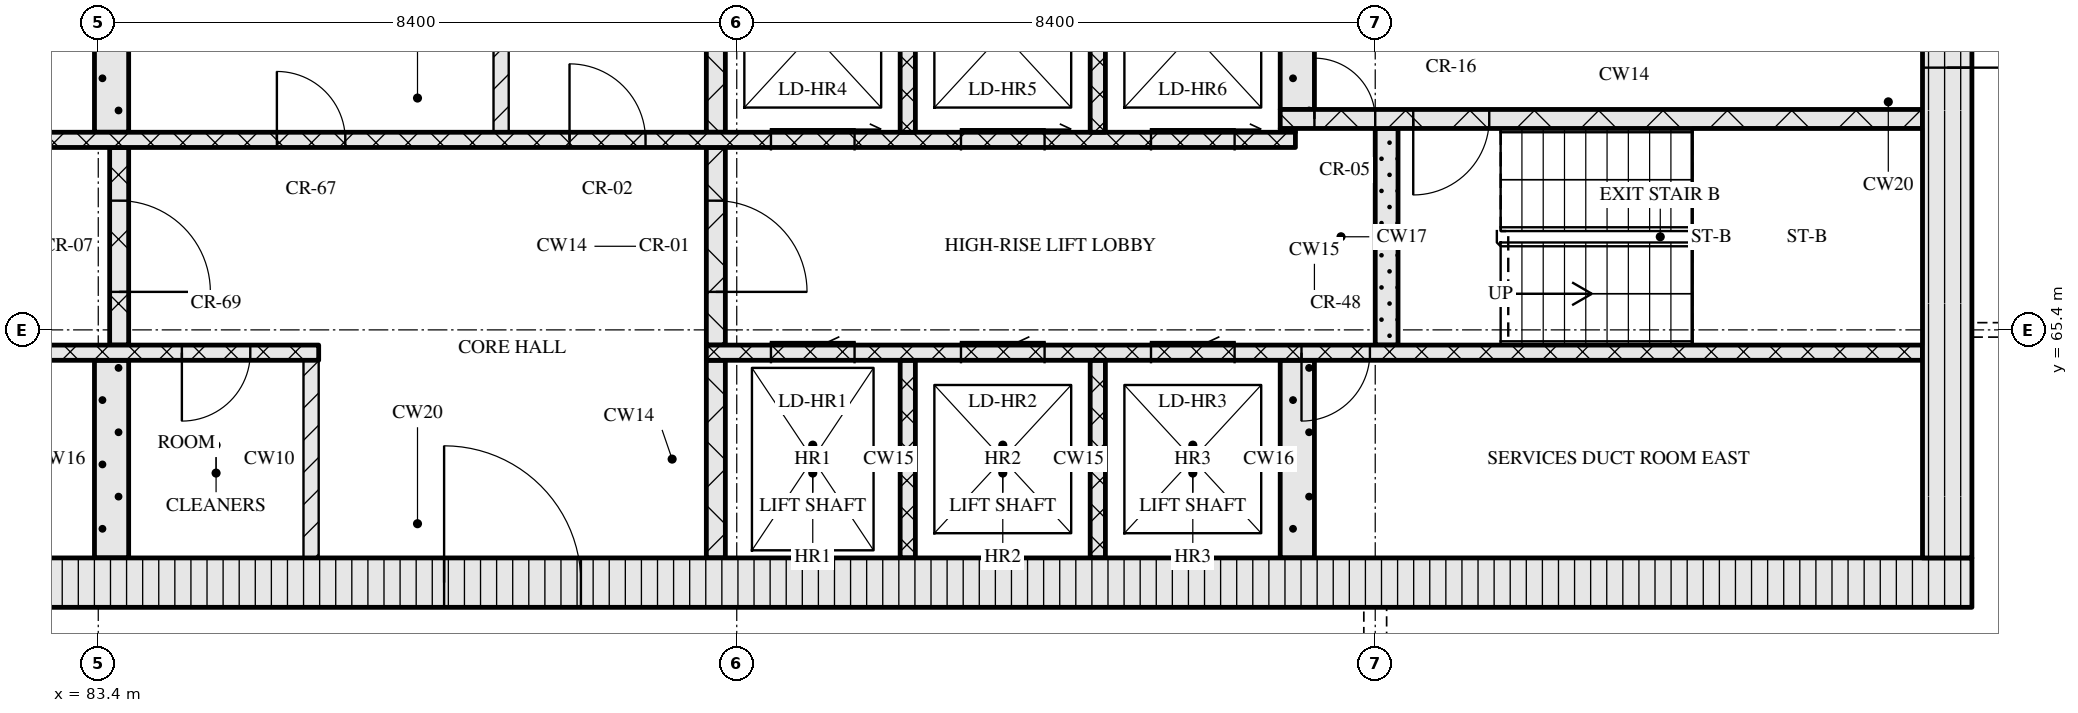
"""IFC4 building model, lengths in metres.
Left out: names, types, materials, properties, quantities, classifications, styles, units other than length and angle.
Written with IfcOpenShell. Run it as: python <this file> out.ifc"""

import sys

from ifc_helpers import new_model, si_unit, direction, frame, frame_2d, origin, place, context, subcontext, project, spatial, rectangle, extrude, element, fill, save


model = new_model("IFC4")
c1 = context("Model", 3, precision=1e-05, world=origin(), true_north=direction((0.0, 1.0)))
c2 = subcontext(c1, "Body", "Model", "MODEL_VIEW")
j1 = project(units=[si_unit("LENGTHUNIT", "METRE"), si_unit("PLANEANGLEUNIT", "RADIAN")], contexts=[c1])
p1 = place(None, origin())
s1 = spatial("IfcSite", under=j1, at=p1, CompositionType="ELEMENT")
p2 = place(p1, origin())
s2 = spatial("IfcBuilding", under=s1, at=p2, CompositionType="ELEMENT")
p3 = place(p2, frame((0.0, 0.0, 216.3)))
s3 = spatial("IfcBuildingStorey", under=s2, at=p3, CompositionType="ELEMENT", Elevation=216.3)
p4 = place(p3, frame((67.15, 62.075, 0.0), z_axis=(0.0, 0.0, 1.0), x_axis=(1.0, 0.0, 0.0)))
e1 = element("IfcWall", 1, at=p4, inside=s3, PredefinedType="SOLIDWALL", context=c2, shape_type="SweptSolid", body=[
    extrude(rectangle(XDim=40.9, YDim=0.65, at=frame_2d((20.45, 0.0))), origin(), (0.0, 0.0, 1.0), 3.32),
])
p5 = place(p4, frame((20.8, 0.0, 0.0)))
e2 = element("IfcOpeningElement", 2, at=p5, cuts=e1, PredefinedType="OPENING", context=c2, shape_type="SweptSolid", body=[
    extrude(rectangle(XDim=1.8, YDim=2.1, at=frame_2d((0.9, 1.05))), frame((0.0, 0.335, 0.0), z_axis=(0.0, -1.0, 0.0), x_axis=(1.0, 0.0, 0.0)), (0.0, 0.0, 1.0), 0.67),
])
p6 = place(p3, frame((107.725, 62.4, 0.0), z_axis=(0.0, 0.0, 1.0), x_axis=(0.0, 1.0, 0.0)))
e3 = element("IfcWall", 3, at=p6, inside=s3, PredefinedType="SOLIDWALL", context=c2, shape_type="SweptSolid", body=[
    extrude(rectangle(XDim=12.0, YDim=0.65, at=frame_2d((6.0, 0.0))), origin(), (0.0, 0.0, 1.0), 3.32),
])
p7 = place(p6, frame((6.45, 0.0, 0.0)))
e4 = element("IfcOpeningElement", 4, at=p7, cuts=e3, PredefinedType="OPENING", context=c2, shape_type="SweptSolid", body=[
    extrude(rectangle(XDim=1.2, YDim=2.1, at=frame_2d((0.6, 1.05))), frame((0.0, 0.335, 0.0), z_axis=(0.0, -1.0, 0.0), x_axis=(1.0, 0.0, 0.0)), (0.0, 0.0, 1.0), 0.67),
])
p8 = place(p3, frame((83.575, 62.4, 0.0), z_axis=(0.0, 0.0, 1.0), x_axis=(0.0, 1.0, 0.0)))
e5 = element("IfcWall", 5, at=p8, inside=s3, PredefinedType="SOLIDWALL", context=c2, shape_type="SweptSolid", body=[
    extrude(rectangle(XDim=2.6, YDim=0.45, at=frame_2d((1.3, 0.0))), origin(), (0.0, 0.0, 1.0), 3.32),
])
p9 = place(p3, frame((86.2, 62.4, 0.0), z_axis=(0.0, 0.0, 1.0), x_axis=(0.0, 1.0, 0.0)))
e6 = element("IfcWall", 6, at=p9, inside=s3, PredefinedType="PARTITIONING", context=c2, shape_type="SweptSolid", body=[
    extrude(rectangle(XDim=2.6, YDim=0.2, at=frame_2d((1.3, 0.0))), origin(), (0.0, 0.0, 1.0), 3.32),
])
p10 = place(p3, frame((91.525, 62.4, 0.0), z_axis=(0.0, 0.0, 1.0), x_axis=(0.0, 1.0, 0.0)))
e7 = element("IfcWall", 7, at=p10, inside=s3, PredefinedType="SOLIDWALL", context=c2, shape_type="SweptSolid", body=[
    extrude(rectangle(XDim=2.6, YDim=0.25, at=frame_2d((1.3, 0.0))), origin(), (0.0, 0.0, 1.0), 3.32),
])
for number, where, z_axis, x_axis in (
    (8, (94.05, 62.4, 0.0), (0.0, 0.0, 1.0), (0.0, 1.0, 0.0)),
    (9, (96.55, 62.4, 0.0), (0.0, 0.0, 1.0), (0.0, 1.0, 0.0)),
):
    element("IfcWall", number, at=place(p3, frame(where, z_axis=z_axis, x_axis=x_axis)), inside=s3, PredefinedType="SOLIDWALL", context=c2, shape_type="SweptSolid", body=[
        extrude(rectangle(XDim=2.6, YDim=0.2, at=frame_2d((1.3, 0.0))), origin(), (0.0, 0.0, 1.0), 3.32),
    ])
p11 = place(p3, frame((99.175, 62.4, 0.0), z_axis=(0.0, 0.0, 1.0), x_axis=(0.0, 1.0, 0.0)))
e10 = element("IfcWall", 10, at=p11, inside=s3, PredefinedType="SOLIDWALL", context=c2, shape_type="SweptSolid", body=[
    extrude(rectangle(XDim=2.6, YDim=0.45, at=frame_2d((1.3, 0.0))), origin(), (0.0, 0.0, 1.0), 3.32),
])
p12 = place(p3, frame((67.8, 65.1, 0.0), z_axis=(0.0, 0.0, 1.0), x_axis=(1.0, 0.0, 0.0)))
e11 = element("IfcWall", 11, at=p12, inside=s3, PredefinedType="SOLIDWALL", context=c2, shape_type="SweptSolid", body=[
    extrude(rectangle(XDim=18.5, YDim=0.2, at=frame_2d((9.25, 0.0))), origin(), (0.0, 0.0, 1.0), 3.32),
])
p13 = place(p12, frame((7.27, 0.0, 0.0)))
e12 = element("IfcOpeningElement", 12, at=p13, cuts=e11, PredefinedType="OPENING", context=c2, shape_type="SweptSolid", body=[
    extrude(rectangle(XDim=0.9, YDim=2.1, at=frame_2d((0.45, 1.05))), frame((0.0, 0.11, 0.0), z_axis=(0.0, -1.0, 0.0), x_axis=(1.0, 0.0, 0.0)), (0.0, 0.0, 1.0), 0.22),
])
p14 = place(p12, frame((10.1, 0.0, 0.0)))
e13 = element("IfcOpeningElement", 13, at=p14, cuts=e11, PredefinedType="OPENING", context=c2, shape_type="SweptSolid", body=[
    extrude(rectangle(XDim=0.9, YDim=2.1, at=frame_2d((0.45, 1.05))), frame((0.0, 0.11, 0.0), z_axis=(0.0, -1.0, 0.0), x_axis=(1.0, 0.0, 0.0)), (0.0, 0.0, 1.0), 0.22),
])
p15 = place(p12, frame((13.81, 0.0, 0.0)))
e14 = element("IfcOpeningElement", 14, at=p15, cuts=e11, PredefinedType="OPENING", context=c2, shape_type="SweptSolid", body=[
    extrude(rectangle(XDim=0.9, YDim=2.1, at=frame_2d((0.45, 1.05))), frame((0.0, 0.11, 0.0), z_axis=(0.0, -1.0, 0.0), x_axis=(1.0, 0.0, 0.0)), (0.0, 0.0, 1.0), 0.22),
])
p16 = place(p12, frame((16.7, 0.0, 0.0)))
e15 = element("IfcOpeningElement", 15, at=p16, cuts=e11, PredefinedType="OPENING", context=c2, shape_type="SweptSolid", body=[
    extrude(rectangle(XDim=0.9, YDim=2.1, at=frame_2d((0.45, 1.05))), frame((0.0, 0.11, 0.0), z_axis=(0.0, -1.0, 0.0), x_axis=(1.0, 0.0, 0.0)), (0.0, 0.0, 1.0), 0.22),
])
p17 = place(p3, frame((91.4, 65.1, 0.0), z_axis=(0.0, 0.0, 1.0), x_axis=(1.0, 0.0, 0.0)))
e16 = element("IfcWall", 16, at=p17, inside=s3, PredefinedType="SOLIDWALL", context=c2, shape_type="SweptSolid", body=[
    extrude(rectangle(XDim=16.0, YDim=0.2, at=frame_2d((8.0, 0.0))), origin(), (0.0, 0.0, 1.0), 3.32),
])
p18 = place(p17, frame((0.85, 0.0, 0.0)))
e17 = element("IfcOpeningElement", 17, at=p18, cuts=e16, PredefinedType="OPENING", context=c2, shape_type="SweptSolid", body=[
    extrude(rectangle(XDim=1.1, YDim=2.1, at=frame_2d((0.55, 1.05))), frame((0.0, 0.11, 0.0), z_axis=(0.0, -1.0, 0.0), x_axis=(1.0, 0.0, 0.0)), (0.0, 0.0, 1.0), 0.22),
])
p19 = place(p17, frame((3.35, 0.0, 0.0)))
e18 = element("IfcOpeningElement", 18, at=p19, cuts=e16, PredefinedType="OPENING", context=c2, shape_type="SweptSolid", body=[
    extrude(rectangle(XDim=1.1, YDim=2.1, at=frame_2d((0.55, 1.05))), frame((0.0, 0.11, 0.0), z_axis=(0.0, -1.0, 0.0), x_axis=(1.0, 0.0, 0.0)), (0.0, 0.0, 1.0), 0.22),
])
p20 = place(p17, frame((5.85, 0.0, 0.0)))
e19 = element("IfcOpeningElement", 19, at=p20, cuts=e16, PredefinedType="OPENING", context=c2, shape_type="SweptSolid", body=[
    extrude(rectangle(XDim=1.1, YDim=2.1, at=frame_2d((0.55, 1.05))), frame((0.0, 0.11, 0.0), z_axis=(0.0, -1.0, 0.0), x_axis=(1.0, 0.0, 0.0)), (0.0, 0.0, 1.0), 0.22),
])
p21 = place(p17, frame((7.83, 0.0, 0.0)))
e20 = element("IfcOpeningElement", 20, at=p21, cuts=e16, PredefinedType="OPENING", context=c2, shape_type="SweptSolid", body=[
    extrude(rectangle(XDim=0.9, YDim=2.1, at=frame_2d((0.45, 1.05))), frame((0.0, 0.11, 0.0), z_axis=(0.0, -1.0, 0.0), x_axis=(1.0, 0.0, 0.0)), (0.0, 0.0, 1.0), 0.22),
])
p22 = place(p3, frame((83.675, 65.2, 0.0), z_axis=(0.0, 0.0, 1.0), x_axis=(0.0, 1.0, 0.0)))
e21 = element("IfcWall", 21, at=p22, inside=s3, PredefinedType="SOLIDWALL", context=c2, shape_type="SweptSolid", body=[
    extrude(rectangle(XDim=2.6, YDim=0.25, at=frame_2d((1.3, 0.0))), origin(), (0.0, 0.0, 1.0), 3.32),
])
p23 = place(p22, frame((0.7, 0.0, 0.0)))
e22 = element("IfcOpeningElement", 22, at=p23, cuts=e21, PredefinedType="OPENING", context=c2, shape_type="SweptSolid", body=[
    extrude(rectangle(XDim=1.2, YDim=2.1, at=frame_2d((0.6, 1.05))), frame((0.0, 0.135, 0.0), z_axis=(0.0, -1.0, 0.0), x_axis=(1.0, 0.0, 0.0)), (0.0, 0.0, 1.0), 0.27),
])
p24 = place(p3, frame((91.525, 65.2, 0.0), z_axis=(0.0, 0.0, 1.0), x_axis=(0.0, 1.0, 0.0)))
e23 = element("IfcWall", 23, at=p24, inside=s3, PredefinedType="SOLIDWALL", context=c2, shape_type="SweptSolid", body=[
    extrude(rectangle(XDim=2.6, YDim=0.25, at=frame_2d((1.3, 0.0))), origin(), (0.0, 0.0, 1.0), 3.32),
])
p25 = place(p24, frame((0.7, 0.0, 0.0)))
e24 = element("IfcOpeningElement", 24, at=p25, cuts=e23, PredefinedType="OPENING", context=c2, shape_type="SweptSolid", body=[
    extrude(rectangle(XDim=1.2, YDim=2.1, at=frame_2d((0.6, 1.05))), frame((0.0, 0.135, 0.0), z_axis=(0.0, -1.0, 0.0), x_axis=(1.0, 0.0, 0.0)), (0.0, 0.0, 1.0), 0.27),
])
p26 = place(p3, frame((100.35, 65.2, 0.0), z_axis=(0.0, 0.0, 1.0), x_axis=(0.0, 1.0, 0.0)))
e25 = element("IfcWall", 25, at=p26, inside=s3, PredefinedType="SOLIDWALL", context=c2, shape_type="SweptSolid", body=[
    extrude(rectangle(XDim=2.85, YDim=0.3, at=frame_2d((1.425, 0.0))), origin(), (0.0, 0.0, 1.0), 3.32),
])
p27 = place(p3, frame((76.05, 67.9, 0.0), z_axis=(0.0, 0.0, 1.0), x_axis=(1.0, 0.0, 0.0)))
e26 = element("IfcWall", 26, at=p27, inside=s3, PredefinedType="SOLIDWALL", context=c2, shape_type="SweptSolid", body=[
    extrude(rectangle(XDim=23.1, YDim=0.2, at=frame_2d((11.55, 0.0))), origin(), (0.0, 0.0, 1.0), 3.32),
])
p28 = place(p27, frame((3.2, 0.0, 0.0)))
e27 = element("IfcOpeningElement", 27, at=p28, cuts=e26, PredefinedType="OPENING", context=c2, shape_type="SweptSolid", body=[
    extrude(rectangle(XDim=0.9, YDim=2.1, at=frame_2d((0.45, 1.05))), frame((0.0, 0.11, 0.0), z_axis=(0.0, -1.0, 0.0), x_axis=(1.0, 0.0, 0.0)), (0.0, 0.0, 1.0), 0.22),
])
p29 = place(p27, frame((9.7, 0.0, 0.0)))
e28 = element("IfcOpeningElement", 28, at=p29, cuts=e26, PredefinedType="OPENING", context=c2, shape_type="SweptSolid", body=[
    extrude(rectangle(XDim=0.9, YDim=2.1, at=frame_2d((0.45, 1.05))), frame((0.0, 0.11, 0.0), z_axis=(0.0, -1.0, 0.0), x_axis=(1.0, 0.0, 0.0)), (0.0, 0.0, 1.0), 0.22),
])
p30 = place(p27, frame((13.55, 0.0, 0.0)))
e29 = element("IfcOpeningElement", 29, at=p30, cuts=e26, PredefinedType="OPENING", context=c2, shape_type="SweptSolid", body=[
    extrude(rectangle(XDim=1.0, YDim=2.1, at=frame_2d((0.5, 1.05))), frame((0.0, 0.11, 0.0), z_axis=(0.0, -1.0, 0.0), x_axis=(1.0, 0.0, 0.0)), (0.0, 0.0, 1.0), 0.22),
])
p31 = place(p27, frame((16.2, 0.0, 0.0)))
e30 = element("IfcOpeningElement", 30, at=p31, cuts=e26, PredefinedType="OPENING", context=c2, shape_type="SweptSolid", body=[
    extrude(rectangle(XDim=1.1, YDim=2.1, at=frame_2d((0.55, 1.05))), frame((0.0, 0.11, 0.0), z_axis=(0.0, -1.0, 0.0), x_axis=(1.0, 0.0, 0.0)), (0.0, 0.0, 1.0), 0.22),
])
p32 = place(p27, frame((18.7, 0.0, 0.0)))
e31 = element("IfcOpeningElement", 31, at=p32, cuts=e26, PredefinedType="OPENING", context=c2, shape_type="SweptSolid", body=[
    extrude(rectangle(XDim=1.1, YDim=2.1, at=frame_2d((0.55, 1.05))), frame((0.0, 0.11, 0.0), z_axis=(0.0, -1.0, 0.0), x_axis=(1.0, 0.0, 0.0)), (0.0, 0.0, 1.0), 0.22),
])
p33 = place(p27, frame((21.2, 0.0, 0.0)))
e32 = element("IfcOpeningElement", 32, at=p33, cuts=e26, PredefinedType="OPENING", context=c2, shape_type="SweptSolid", body=[
    extrude(rectangle(XDim=1.1, YDim=2.1, at=frame_2d((0.55, 1.05))), frame((0.0, 0.11, 0.0), z_axis=(0.0, -1.0, 0.0), x_axis=(1.0, 0.0, 0.0)), (0.0, 0.0, 1.0), 0.22),
])
p34 = place(p3, frame((83.575, 68.0, 0.0), z_axis=(0.0, 0.0, 1.0), x_axis=(0.0, 1.0, 0.0)))
e33 = element("IfcWall", 33, at=p34, inside=s3, PredefinedType="SOLIDWALL", context=c2, shape_type="SweptSolid", body=[
    extrude(rectangle(XDim=2.6, YDim=0.45, at=frame_2d((1.3, 0.0))), origin(), (0.0, 0.0, 1.0), 3.32),
])
p35 = place(p3, frame((88.7, 68.0, 0.0), z_axis=(0.0, 0.0, 1.0), x_axis=(0.0, 1.0, 0.0)))
e34 = element("IfcWall", 34, at=p35, inside=s3, PredefinedType="PARTITIONING", context=c2, shape_type="SweptSolid", body=[
    extrude(rectangle(XDim=2.6, YDim=0.2, at=frame_2d((1.3, 0.0))), origin(), (0.0, 0.0, 1.0), 3.32),
])
p36 = place(p3, frame((91.525, 68.0, 0.0), z_axis=(0.0, 0.0, 1.0), x_axis=(0.0, 1.0, 0.0)))
e35 = element("IfcWall", 35, at=p36, inside=s3, PredefinedType="SOLIDWALL", context=c2, shape_type="SweptSolid", body=[
    extrude(rectangle(XDim=2.6, YDim=0.25, at=frame_2d((1.3, 0.0))), origin(), (0.0, 0.0, 1.0), 3.32),
])
for number, where, z_axis, x_axis in (
    (36, (94.05, 68.0, 0.0), (0.0, 0.0, 1.0), (0.0, 1.0, 0.0)),
    (37, (96.55, 68.0, 0.0), (0.0, 0.0, 1.0), (0.0, 1.0, 0.0)),
):
    element("IfcWall", number, at=place(p3, frame(where, z_axis=z_axis, x_axis=x_axis)), inside=s3, PredefinedType="SOLIDWALL", context=c2, shape_type="SweptSolid", body=[
        extrude(rectangle(XDim=2.6, YDim=0.2, at=frame_2d((1.3, 0.0))), origin(), (0.0, 0.0, 1.0), 3.32),
    ])
p37 = place(p3, frame((98.95, 68.025, 0.0), z_axis=(0.0, 0.0, 1.0), x_axis=(1.0, 0.0, 0.0)))
e38 = element("IfcWall", 38, at=p37, inside=s3, PredefinedType="SOLIDWALL", context=c2, shape_type="SweptSolid", body=[
    extrude(rectangle(XDim=0.2, YDim=0.05, at=frame_2d((0.1, 0.0))), origin(), (0.0, 0.0, 1.0), 3.32),
])
p38 = place(p3, frame((98.95, 68.175, 0.0), z_axis=(0.0, 0.0, 1.0), x_axis=(1.0, 0.0, 0.0)))
e39 = element("IfcWall", 39, at=p38, inside=s3, PredefinedType="SOLIDWALL", context=c2, shape_type="SweptSolid", body=[
    extrude(rectangle(XDim=8.45, YDim=0.25, at=frame_2d((4.225, 0.0))), origin(), (0.0, 0.0, 1.0), 3.32),
])
p39 = place(p38, frame((0.45, 0.0, 0.0)))
e40 = element("IfcOpeningElement", 40, at=p39, cuts=e39, PredefinedType="OPENING", context=c2, shape_type="SweptSolid", body=[
    extrude(rectangle(XDim=0.8, YDim=2.1, at=frame_2d((0.4, 1.05))), frame((0.0, 0.135, 0.0), z_axis=(0.0, -1.0, 0.0), x_axis=(1.0, 0.0, 0.0)), (0.0, 0.0, 1.0), 0.27),
])
p40 = place(p38, frame((1.75, 0.0, 0.0)))
e41 = element("IfcOpeningElement", 41, at=p40, cuts=e39, PredefinedType="OPENING", context=c2, shape_type="SweptSolid", body=[
    extrude(rectangle(XDim=1.0, YDim=2.1, at=frame_2d((0.5, 1.05))), frame((0.0, 0.135, 0.0), z_axis=(0.0, -1.0, 0.0), x_axis=(1.0, 0.0, 0.0)), (0.0, 0.0, 1.0), 0.27),
])
p41 = place(p3, frame((99.175, 68.3, 0.0), z_axis=(0.0, 0.0, 1.0), x_axis=(0.0, 1.0, 0.0)))
e42 = element("IfcWall", 42, at=p41, inside=s3, PredefinedType="SOLIDWALL", context=c2, shape_type="SweptSolid", body=[
    extrude(rectangle(XDim=2.3, YDim=0.45, at=frame_2d((1.15, 0.0))), origin(), (0.0, 0.0, 1.0), 3.32),
])
p42 = place(p5, origin())
e43 = element("IfcDoor", 43, at=p42, inside=s3, OperationType="DOUBLE_DOOR_SINGLE_SWING", PredefinedType="DOOR", context=c2, shape_type="SweptSolid", body=[
    extrude(rectangle(XDim=1.8, YDim=2.1, at=frame_2d((0.9, 1.05))), frame((0.0, 0.025, 0.0), z_axis=(0.0, -1.0, 0.0), x_axis=(1.0, 0.0, 0.0)), (0.0, 0.0, 1.0), 0.05),
])
fill(e2, e43)
p43 = place(p16, origin())
e44 = element("IfcDoor", 44, at=p43, inside=s3, OperationType="SINGLE_SWING_RIGHT", PredefinedType="DOOR", context=c2, shape_type="SweptSolid", body=[
    extrude(rectangle(XDim=0.9, YDim=2.1, at=frame_2d((0.45, 1.05))), frame((0.0, 0.025, 0.0), z_axis=(0.0, -1.0, 0.0), x_axis=(1.0, 0.0, 0.0)), (0.0, 0.0, 1.0), 0.05),
])
fill(e15, e44)
p44 = place(p18, origin())
e45 = element("IfcDoor", 45, at=p44, inside=s3, OperationType="SLIDING_TO_LEFT", PredefinedType="DOOR", context=c2, shape_type="SweptSolid", body=[
    extrude(rectangle(XDim=1.1, YDim=2.1, at=frame_2d((0.55, 1.05))), frame((0.0, 0.025, 0.0), z_axis=(0.0, -1.0, 0.0), x_axis=(1.0, 0.0, 0.0)), (0.0, 0.0, 1.0), 0.05),
])
fill(e17, e45)
p45 = place(p19, origin())
e46 = element("IfcDoor", 46, at=p45, inside=s3, OperationType="SLIDING_TO_LEFT", PredefinedType="DOOR", context=c2, shape_type="SweptSolid", body=[
    extrude(rectangle(XDim=1.1, YDim=2.1, at=frame_2d((0.55, 1.05))), frame((0.0, 0.025, 0.0), z_axis=(0.0, -1.0, 0.0), x_axis=(1.0, 0.0, 0.0)), (0.0, 0.0, 1.0), 0.05),
])
fill(e18, e46)
p46 = place(p20, origin())
e47 = element("IfcDoor", 47, at=p46, inside=s3, OperationType="SLIDING_TO_LEFT", PredefinedType="DOOR", context=c2, shape_type="SweptSolid", body=[
    extrude(rectangle(XDim=1.1, YDim=2.1, at=frame_2d((0.55, 1.05))), frame((0.0, 0.025, 0.0), z_axis=(0.0, -1.0, 0.0), x_axis=(1.0, 0.0, 0.0)), (0.0, 0.0, 1.0), 0.05),
])
fill(e19, e47)
p47 = place(p21, origin())
e48 = element("IfcDoor", 48, at=p47, inside=s3, OperationType="SINGLE_SWING_RIGHT", PredefinedType="DOOR", context=c2, shape_type="SweptSolid", body=[
    extrude(rectangle(XDim=0.9, YDim=2.1, at=frame_2d((0.45, 1.05))), frame((0.0, 0.025, 0.0), z_axis=(0.0, -1.0, 0.0), x_axis=(1.0, 0.0, 0.0)), (0.0, 0.0, 1.0), 0.05),
])
fill(e20, e48)
p48 = place(p23, origin())
e49 = element("IfcDoor", 49, at=p48, inside=s3, OperationType="SINGLE_SWING_RIGHT", PredefinedType="DOOR", context=c2, shape_type="SweptSolid", body=[
    extrude(rectangle(XDim=1.2, YDim=2.1, at=frame_2d((0.6, 1.05))), frame((0.0, 0.025, 0.0), z_axis=(0.0, -1.0, 0.0), x_axis=(1.0, 0.0, 0.0)), (0.0, 0.0, 1.0), 0.05),
])
fill(e22, e49)
p49 = place(p25, origin())
e50 = element("IfcDoor", 50, at=p49, inside=s3, OperationType="SINGLE_SWING_RIGHT", PredefinedType="DOOR", context=c2, shape_type="SweptSolid", body=[
    extrude(rectangle(XDim=1.2, YDim=2.1, at=frame_2d((0.6, 1.05))), frame((0.0, 0.025, 0.0), z_axis=(0.0, -1.0, 0.0), x_axis=(1.0, 0.0, 0.0)), (0.0, 0.0, 1.0), 0.05),
])
fill(e24, e50)
p50 = place(p29, origin())
e51 = element("IfcDoor", 51, at=p50, inside=s3, OperationType="SINGLE_SWING_LEFT", PredefinedType="DOOR", context=c2, shape_type="SweptSolid", body=[
    extrude(rectangle(XDim=0.9, YDim=2.1, at=frame_2d((0.45, 1.05))), frame((0.0, 0.025, 0.0), z_axis=(0.0, -1.0, 0.0), x_axis=(1.0, 0.0, 0.0)), (0.0, 0.0, 1.0), 0.05),
])
fill(e28, e51)
p51 = place(p30, origin())
e52 = element("IfcDoor", 52, at=p51, inside=s3, OperationType="SINGLE_SWING_LEFT", PredefinedType="DOOR", context=c2, shape_type="SweptSolid", body=[
    extrude(rectangle(XDim=1.0, YDim=2.1, at=frame_2d((0.5, 1.05))), frame((0.0, 0.025, 0.0), z_axis=(0.0, -1.0, 0.0), x_axis=(1.0, 0.0, 0.0)), (0.0, 0.0, 1.0), 0.05),
])
fill(e29, e52)
p52 = place(p31, origin())
e53 = element("IfcDoor", 53, at=p52, inside=s3, OperationType="SLIDING_TO_RIGHT", PredefinedType="DOOR", context=c2, shape_type="SweptSolid", body=[
    extrude(rectangle(XDim=1.1, YDim=2.1, at=frame_2d((0.55, 1.05))), frame((0.0, 0.025, 0.0), z_axis=(0.0, -1.0, 0.0), x_axis=(1.0, 0.0, 0.0)), (0.0, 0.0, 1.0), 0.05),
])
fill(e30, e53)
p53 = place(p32, origin())
e54 = element("IfcDoor", 54, at=p53, inside=s3, OperationType="SLIDING_TO_RIGHT", PredefinedType="DOOR", context=c2, shape_type="SweptSolid", body=[
    extrude(rectangle(XDim=1.1, YDim=2.1, at=frame_2d((0.55, 1.05))), frame((0.0, 0.025, 0.0), z_axis=(0.0, -1.0, 0.0), x_axis=(1.0, 0.0, 0.0)), (0.0, 0.0, 1.0), 0.05),
])
fill(e31, e54)
p54 = place(p33, origin())
e55 = element("IfcDoor", 55, at=p54, inside=s3, OperationType="SLIDING_TO_RIGHT", PredefinedType="DOOR", context=c2, shape_type="SweptSolid", body=[
    extrude(rectangle(XDim=1.1, YDim=2.1, at=frame_2d((0.55, 1.05))), frame((0.0, 0.025, 0.0), z_axis=(0.0, -1.0, 0.0), x_axis=(1.0, 0.0, 0.0)), (0.0, 0.0, 1.0), 0.05),
])
fill(e32, e55)
p55 = place(p39, origin())
e56 = element("IfcDoor", 56, at=p55, inside=s3, OperationType="SINGLE_SWING_LEFT", PredefinedType="DOOR", context=c2, shape_type="SweptSolid", body=[
    extrude(rectangle(XDim=0.8, YDim=2.1, at=frame_2d((0.4, 1.05))), frame((0.0, 0.025, 0.0), z_axis=(0.0, -1.0, 0.0), x_axis=(1.0, 0.0, 0.0)), (0.0, 0.0, 1.0), 0.05),
])
fill(e40, e56)
p56 = place(p40, origin())
e57 = element("IfcDoor", 57, at=p56, inside=s3, OperationType="SINGLE_SWING_RIGHT", PredefinedType="DOOR", context=c2, shape_type="SweptSolid", body=[
    extrude(rectangle(XDim=1.0, YDim=2.1, at=frame_2d((0.5, 1.05))), frame((0.0, 0.025, 0.0), z_axis=(0.0, -1.0, 0.0), x_axis=(1.0, 0.0, 0.0)), (0.0, 0.0, 1.0), 0.05),
])
fill(e41, e57)
p57 = place(p7, origin())
e58 = element("IfcDoor", 58, at=p57, inside=s3, OperationType="SINGLE_SWING_RIGHT", PredefinedType="DOOR", context=c2, shape_type="SweptSolid", body=[
    extrude(rectangle(XDim=1.2, YDim=2.1, at=frame_2d((0.6, 1.05))), frame((0.0, 0.025, 0.0), z_axis=(0.0, -1.0, 0.0), x_axis=(1.0, 0.0, 0.0)), (0.0, 0.0, 1.0), 0.05),
])
fill(e4, e58)
save(model, sys.argv[1])
